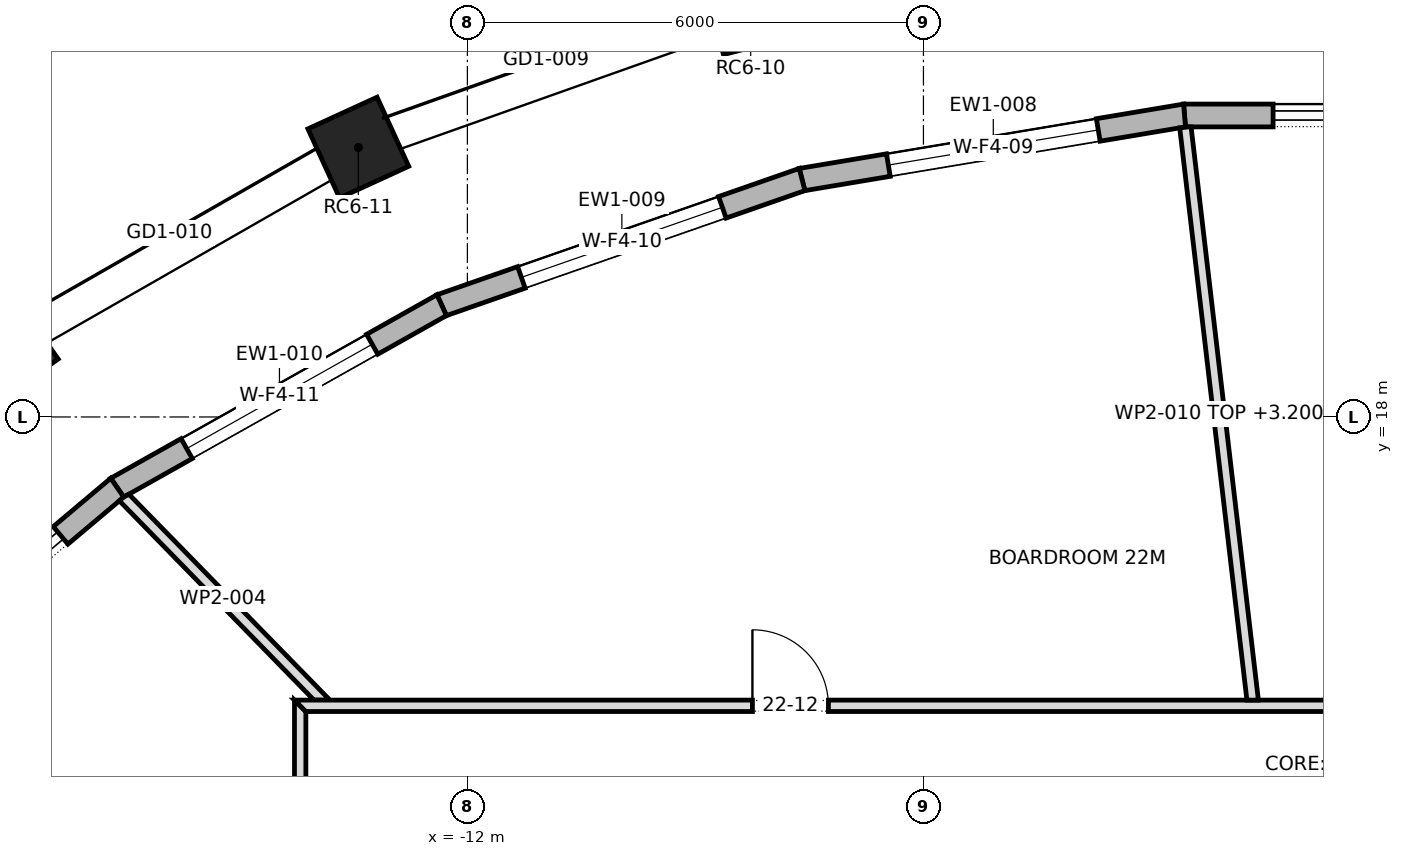
"""IFC4 building model, lengths in metres.
Left out: names, types, materials, properties, quantities, classifications, styles, units other than length and angle.
Written with IfcOpenShell. Run it as: python <this file> out.ifc"""

import sys

from ifc_helpers import new_model, si_unit, direction, frame, frame_2d, origin, origin_2d, place, context, subcontext, project, spatial, polyline, rectangle, outline, extrude, element, fill, save


model = new_model("IFC4")
c1 = context("Model", 3, precision=1e-05, world=origin(), true_north=direction((0.0, 1.0)))
c2 = subcontext(c1, "Body", "Model", "MODEL_VIEW")
j1 = project(units=[si_unit("LENGTHUNIT", "METRE"), si_unit("PLANEANGLEUNIT", "RADIAN")], contexts=[c1])
p1 = place(None, origin())
s1 = spatial("IfcSite", under=j1, at=p1, CompositionType="ELEMENT")
p2 = place(p1, origin())
s2 = spatial("IfcBuilding", under=s1, at=p2, CompositionType="ELEMENT")
p3 = place(p2, frame((0.0, 0.0, 312.3)))
s3 = spatial("IfcBuildingStorey", under=s2, at=p3, CompositionType="ELEMENT", Elevation=312.3)
for number, where, z_axis, x_axis in (
    (1, (-8.273, 23.377, 0.0), (0.0, 0.0, 1.0), (-0.968, -0.252, 0.0)),
    (2, (-13.435, 21.544, 0.0), (0.0, 0.0, 1.0), (-0.909, -0.417, 0.0)),
    (3, (-18.08, 18.884, 0.0), (0.0, 0.0, 1.0), (-0.818, -0.575, 0.0)),
):
    element("IfcColumn", number, at=place(p3, frame(where, z_axis=z_axis, x_axis=x_axis)), inside=s3, PredefinedType="COLUMN", context=c2, shape_type="SweptSolid", body=[
        extrude(rectangle(XDim=1.0, YDim=1.0, at=origin_2d()), origin(), (0.0, 0.0, 1.0), 4.0),
    ])
p4 = place(p3, frame((2.565, 21.966, 0.0), z_axis=(0.0, 0.0, 1.0), x_axis=(-1.0, 0.0, 0.0)))
e4 = element("IfcWall", 4, at=p4, inside=s3, PredefinedType="STANDARD", context=c2, shape_type="SweptSolid", body=[
    extrude(outline(polyline([(-0.012, -0.15), (5.143, -0.15), (5.118, 0.15), (0.012, 0.15), (-0.012, -0.15)])), origin(), (0.0, 0.0, 1.0), 3.7),
])
p5 = place(p4, frame((1.165, 0.0, 0.0)))
e5 = element("IfcOpeningElement", 5, at=p5, cuts=e4, PredefinedType="OPENING", context=c2, shape_type="SweptSolid", body=[
    extrude(rectangle(XDim=2.8, YDim=3.25, at=frame_2d((1.4, 1.625))), frame((0.0, 0.162, 0.0), z_axis=(0.0, -1.0, 0.0), x_axis=(1.0, 0.0, 0.0)), (0.0, 0.0, 1.0), 0.324),
])
p6 = place(p3, frame((-2.565, 21.966, 0.0), z_axis=(0.0, 0.0, 1.0), x_axis=(-0.986269480969, -0.165143909695, 0.0)))
e6 = element("IfcWall", 6, at=p6, inside=s3, PredefinedType="STANDARD", context=c2, shape_type="SweptSolid", body=[
    extrude(outline(polyline([(-0.012, -0.15), (5.115, -0.15), (5.089, 0.15), (0.012, 0.15), (-0.012, -0.15)])), origin(), (0.0, 0.0, 1.0), 3.7),
])
p7 = place(p6, frame((1.151, 0.0, 0.6)))
e7 = element("IfcOpeningElement", 7, at=p7, cuts=e6, PredefinedType="OPENING", context=c2, shape_type="SweptSolid", body=[
    extrude(rectangle(XDim=2.8, YDim=2.65, at=frame_2d((1.4, 1.325))), frame((0.0, 0.162, 0.0), z_axis=(0.0, -1.0, 0.0), x_axis=(1.0, 0.0, 0.0)), (0.0, 0.0, 1.0), 0.324),
])
p8 = place(p3, frame((-7.597, 21.124, 0.0), z_axis=(0.0, 0.0, 1.0), x_axis=(-0.944251863618, -0.329223963365, 0.0)))
e8 = element("IfcWall", 8, at=p8, inside=s3, PredefinedType="STANDARD", context=c2, shape_type="SweptSolid", body=[
    extrude(outline(polyline([(-0.013, -0.15), (5.034, -0.15), (5.008, 0.15), (0.013, 0.15), (-0.013, -0.15)])), origin(), (0.0, 0.0, 1.0), 3.7),
])
p9 = place(p8, frame((1.111, 0.0, 0.6)))
e9 = element("IfcOpeningElement", 9, at=p9, cuts=e8, PredefinedType="OPENING", context=c2, shape_type="SweptSolid", body=[
    extrude(rectangle(XDim=2.8, YDim=2.65, at=frame_2d((1.4, 1.325))), frame((0.0, 0.162, 0.0), z_axis=(0.0, -1.0, 0.0), x_axis=(1.0, 0.0, 0.0)), (0.0, 0.0, 1.0), 0.324),
])
p10 = place(p3, frame((-12.338, 19.471, 0.0), z_axis=(0.0, 0.0, 1.0), x_axis=(-0.871570211895, -0.490270706588, 0.0)))
e10 = element("IfcWall", 10, at=p10, inside=s3, PredefinedType="STANDARD", context=c2, shape_type="SweptSolid", body=[
    extrude(outline(polyline([(-0.013, -0.15), (4.912, -0.15), (4.883, 0.15), (0.013, 0.15), (-0.013, -0.15)])), origin(), (0.0, 0.0, 1.0), 3.7),
])
p11 = place(p10, frame((1.049, 0.0, 0.6)))
e11 = element("IfcOpeningElement", 11, at=p11, cuts=e10, PredefinedType="OPENING", context=c2, shape_type="SweptSolid", body=[
    extrude(rectangle(XDim=2.8, YDim=2.65, at=frame_2d((1.4, 1.325))), frame((0.0, 0.162, 0.0), z_axis=(0.0, -1.0, 0.0), x_axis=(1.0, 0.0, 0.0)), (0.0, 0.0, 1.0), 0.324),
])
p12 = place(p3, frame((-16.607, 17.07, 0.0), z_axis=(0.0, 0.0, 1.0), x_axis=(-0.765059193792, -0.643959959931, 0.0)))
e12 = element("IfcWall", 12, at=p12, inside=s3, PredefinedType="STANDARD", context=c2, shape_type="SweptSolid", body=[
    extrude(outline(polyline([(-0.014, -0.15), (4.763, -0.15), (4.733, 0.15), (0.014, 0.15), (-0.014, -0.15)])), origin(), (0.0, 0.0, 1.0), 3.7),
])
p13 = place(p12, frame((0.974, 0.0, 0.0)))
e13 = element("IfcOpeningElement", 13, at=p13, cuts=e12, PredefinedType="OPENING", context=c2, shape_type="SweptSolid", body=[
    extrude(rectangle(XDim=2.8, YDim=3.25, at=frame_2d((1.4, 1.625))), frame((0.0, 0.162, 0.0), z_axis=(0.0, -1.0, 0.0), x_axis=(1.0, 0.0, 0.0)), (0.0, 0.0, 1.0), 0.324),
])
p14 = place(p3, frame((-16.525, 16.95, 0.0), z_axis=(0.0, 0.0, 1.0), x_axis=(0.698599984797, -0.715512446602, 0.0)))
e14 = element("IfcWall", 14, at=p14, inside=s3, PredefinedType="PARTITIONING", context=c2, shape_type="SweptSolid", body=[
    extrude(outline(polyline([(0.0, -0.075), (1.833, -0.075), (3.665, -0.075), (3.811, 0.075), (3.811, 0.075), (1.918, 0.075), (0.025, 0.075), (0.005, 0.0), (0.0, -0.074), (0.0, -0.075)])), origin(), (0.0, 0.0, 1.0), 3.7),
])
p15 = place(p3, frame((-14.2, -14.275, 0.0), z_axis=(0.0, 0.0, 1.0), x_axis=(0.0, 1.0, 0.0)))
e15 = element("IfcWall", 15, at=p15, inside=s3, PredefinedType="PARTITIONING", context=c2, shape_type="SweptSolid", body=[
    extrude(outline(polyline([(0.15, -0.075), (2.033, -0.075), (3.917, -0.075), (5.8, -0.075), (7.683, -0.075), (9.567, -0.075), (11.45, -0.075), (13.333, -0.075), (15.217, -0.075), (17.1, -0.075), (18.983, -0.075), (20.866, -0.075), (22.75, -0.075), (24.633, -0.075), (26.517, -0.075), (28.4, -0.075), (28.55, 0.075), (28.55, 0.075), (26.646, 0.075), (24.743, 0.075), (22.84, 0.075), (20.937, 0.075), (19.033, 0.075), (17.13, 0.075), (15.227, 0.075), (13.323, 0.075), (11.42, 0.075), (9.517, 0.075), (7.613, 0.075), (5.71, 0.075), (3.807, 0.075), (1.903, 0.075), (0.0, 0.075), (0.15, -0.075)])), origin(), (0.0, 0.0, 1.0), 3.7),
])
p16 = place(p15, frame((21.465, 0.0, 0.0)))
e16 = element("IfcOpeningElement", 16, at=p16, cuts=e15, PredefinedType="OPENING", context=c2, shape_type="SweptSolid", body=[
    extrude(rectangle(XDim=1.0, YDim=2.1, at=frame_2d((0.5, 1.05))), frame((0.0, 0.087, 0.0), z_axis=(0.0, -1.0, 0.0), x_axis=(1.0, 0.0, 0.0)), (0.0, 0.0, 1.0), 0.174),
])
p17 = place(p15, frame((12.55, 0.0, 0.0)))
e17 = element("IfcOpeningElement", 17, at=p17, cuts=e15, PredefinedType="OPENING", context=c2, shape_type="SweptSolid", body=[
    extrude(rectangle(XDim=1.0, YDim=2.1, at=frame_2d((0.5, 1.05))), frame((0.0, 0.087, 0.0), z_axis=(0.0, -1.0, 0.0), x_axis=(1.0, 0.0, 0.0)), (0.0, 0.0, 1.0), 0.174),
])
p18 = place(p15, frame((7.055, 0.0, 0.0)))
e18 = element("IfcOpeningElement", 18, at=p18, cuts=e15, PredefinedType="OPENING", context=c2, shape_type="SweptSolid", body=[
    extrude(rectangle(XDim=1.0, YDim=2.1, at=frame_2d((0.5, 1.05))), frame((0.0, 0.087, 0.0), z_axis=(0.0, -1.0, 0.0), x_axis=(1.0, 0.0, 0.0)), (0.0, 0.0, 1.0), 0.174),
])
p19 = place(p3, frame((-14.275, 14.2, 0.0), z_axis=(0.0, 0.0, 1.0), x_axis=(1.0, 0.0, 0.0)))
e19 = element("IfcWall", 19, at=p19, inside=s3, PredefinedType="PARTITIONING", context=c2, shape_type="SweptSolid", body=[
    extrude(outline(polyline([(0.15, -0.075), (2.033, -0.075), (3.917, -0.075), (5.8, -0.075), (7.683, -0.075), (9.567, -0.075), (11.45, -0.075), (13.333, -0.075), (15.217, -0.075), (17.1, -0.075), (18.983, -0.075), (20.866, -0.075), (22.75, -0.075), (24.633, -0.075), (26.517, -0.075), (28.4, -0.075), (28.55, 0.075), (28.55, 0.075), (26.646, 0.075), (24.743, 0.075), (22.84, 0.075), (20.937, 0.075), (19.033, 0.075), (17.13, 0.075), (15.227, 0.075), (13.323, 0.075), (11.42, 0.075), (9.517, 0.075), (7.613, 0.075), (5.71, 0.075), (3.807, 0.075), (1.903, 0.075), (0.0, 0.075), (0.15, -0.075)])), origin(), (0.0, 0.0, 1.0), 3.7),
])
p20 = place(p19, frame((20.045, 0.0, 0.0)))
e20 = element("IfcOpeningElement", 20, at=p20, cuts=e19, PredefinedType="OPENING", context=c2, shape_type="SweptSolid", body=[
    extrude(rectangle(XDim=1.0, YDim=2.1, at=frame_2d((0.5, 1.05))), frame((0.0, 0.087, 0.0), z_axis=(0.0, -1.0, 0.0), x_axis=(1.0, 0.0, 0.0)), (0.0, 0.0, 1.0), 0.174),
])
p21 = place(p19, frame((6.025, 0.0, 0.0)))
e21 = element("IfcOpeningElement", 21, at=p21, cuts=e19, PredefinedType="OPENING", context=c2, shape_type="SweptSolid", body=[
    extrude(rectangle(XDim=1.0, YDim=2.1, at=frame_2d((0.5, 1.05))), frame((0.0, 0.087, 0.0), z_axis=(0.0, -1.0, 0.0), x_axis=(1.0, 0.0, 0.0)), (0.0, 0.0, 1.0), 0.174),
])
p22 = place(p3, frame((-1.668, 14.267, 0.0), z_axis=(0.0, 0.0, 1.0), x_axis=(-0.116619367809, 0.993176682696, 0.0)))
e22 = element("IfcWall", 22, at=p22, inside=s3, PredefinedType="PARTITIONING", context=c2, shape_type="SweptSolid", body=[
    extrude(outline(polyline([(0.0, -0.075), (1.898, -0.075), (3.796, -0.075), (5.695, -0.075), (7.593, -0.075), (7.597, -0.037), (7.597, 0.075), (5.702, 0.075), (3.807, 0.075), (1.912, 0.075), (0.017, 0.075), (0.0, -0.072), (0.0, -0.075)])), origin(), (0.0, 0.0, 1.0), 3.2),
])
p23 = place(p5, origin())
e23 = element("IfcDoor", 23, at=p23, inside=s3, OperationType="DOUBLE_DOOR_SLIDING", PredefinedType="DOOR", context=c2, shape_type="SweptSolid", body=[
    extrude(rectangle(XDim=2.8, YDim=3.25, at=frame_2d((1.4, 1.625))), frame((0.0, 0.025, 0.0), z_axis=(0.0, -1.0, 0.0), x_axis=(1.0, 0.0, 0.0)), (0.0, 0.0, 1.0), 0.05),
])
fill(e5, e23)
p24 = place(p7, origin())
e24 = element("IfcWindow", 24, at=p24, inside=s3, PartitioningType="DOUBLE_PANEL_VERTICAL", PredefinedType="WINDOW", context=c2, shape_type="SweptSolid", body=[
    extrude(rectangle(XDim=2.8, YDim=2.65, at=frame_2d((1.4, 1.325))), frame((0.0, 0.03, 0.0), z_axis=(0.0, -1.0, 0.0), x_axis=(1.0, 0.0, 0.0)), (0.0, 0.0, 1.0), 0.06),
])
fill(e7, e24)
p25 = place(p9, origin())
e25 = element("IfcWindow", 25, at=p25, inside=s3, PartitioningType="DOUBLE_PANEL_VERTICAL", PredefinedType="WINDOW", context=c2, shape_type="SweptSolid", body=[
    extrude(rectangle(XDim=2.8, YDim=2.65, at=frame_2d((1.4, 1.325))), frame((0.0, 0.03, 0.0), z_axis=(0.0, -1.0, 0.0), x_axis=(1.0, 0.0, 0.0)), (0.0, 0.0, 1.0), 0.06),
])
fill(e9, e25)
p26 = place(p11, origin())
e26 = element("IfcWindow", 26, at=p26, inside=s3, PartitioningType="DOUBLE_PANEL_VERTICAL", PredefinedType="WINDOW", context=c2, shape_type="SweptSolid", body=[
    extrude(rectangle(XDim=2.8, YDim=2.65, at=frame_2d((1.4, 1.325))), frame((0.0, 0.03, 0.0), z_axis=(0.0, -1.0, 0.0), x_axis=(1.0, 0.0, 0.0)), (0.0, 0.0, 1.0), 0.06),
])
fill(e11, e26)
p27 = place(p13, origin())
e27 = element("IfcDoor", 27, at=p27, inside=s3, OperationType="DOUBLE_DOOR_SLIDING", PredefinedType="DOOR", context=c2, shape_type="SweptSolid", body=[
    extrude(rectangle(XDim=2.8, YDim=3.25, at=frame_2d((1.4, 1.625))), frame((0.0, 0.025, 0.0), z_axis=(0.0, -1.0, 0.0), x_axis=(1.0, 0.0, 0.0)), (0.0, 0.0, 1.0), 0.05),
])
fill(e13, e27)
p28 = place(p21, origin())
e28 = element("IfcDoor", 28, at=p28, inside=s3, OperationType="SINGLE_SWING_RIGHT", PredefinedType="DOOR", context=c2, shape_type="SweptSolid", body=[
    extrude(rectangle(XDim=1.0, YDim=2.1, at=frame_2d((0.5, 1.05))), frame((0.0, 0.025, 0.0), z_axis=(0.0, -1.0, 0.0), x_axis=(1.0, 0.0, 0.0)), (0.0, 0.0, 1.0), 0.05),
])
fill(e21, e28)
save(model, sys.argv[1])
